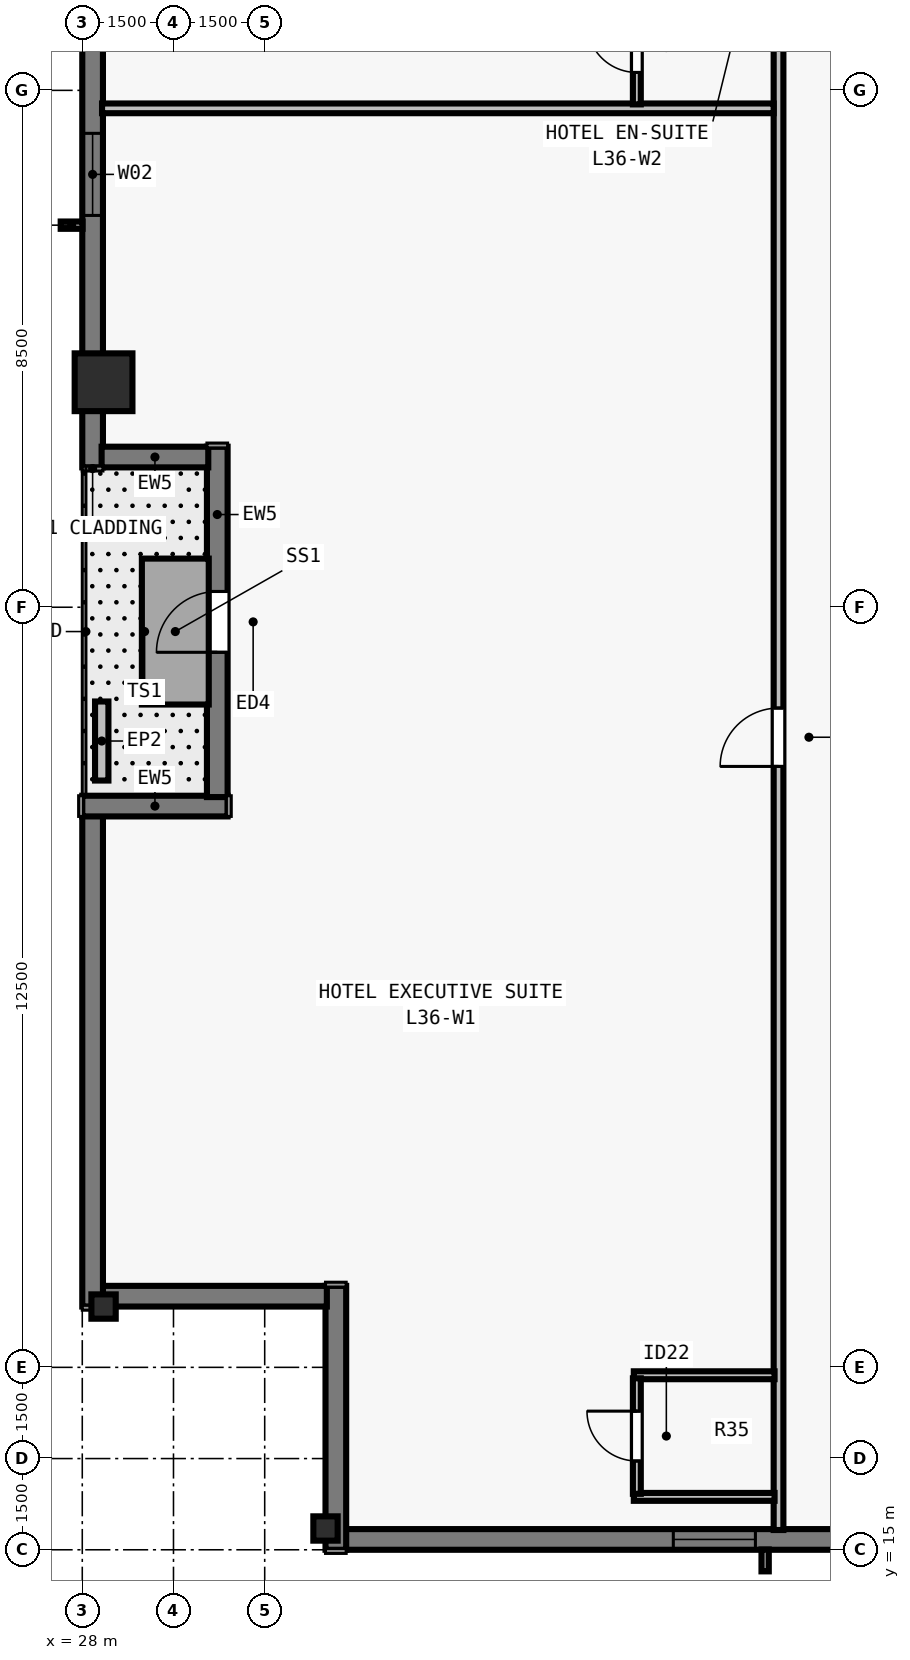
"""IFC4 building model, lengths in metres.
Left out: names, types, materials, properties, quantities, classifications, styles, units other than length and angle.
Written with IfcOpenShell. Run it as: python <this file> out.ifc"""

import sys

from ifc_helpers import new_model, si_unit, direction, frame, frame_2d, origin, origin_2d, place, context, subcontext, project, spatial, rectangle, i_section, extrude, element, fill, save


model = new_model("IFC4")
c1 = context("Model", 3, precision=1e-05, world=origin(), true_north=direction((0.0, 1.0)))
c2 = subcontext(c1, "Body", "Model", "MODEL_VIEW")
j1 = project(units=[si_unit("LENGTHUNIT", "METRE"), si_unit("PLANEANGLEUNIT", "RADIAN")], contexts=[c1])
p1 = place(None, origin())
s1 = spatial("IfcSite", under=j1, at=p1, CompositionType="ELEMENT")
p2 = place(p1, origin())
s2 = spatial("IfcBuilding", under=s1, at=p2, CompositionType="ELEMENT")
p3 = place(p2, frame((0.0, 0.0, 134.0)))
s3 = spatial("IfcBuildingStorey", under=s2, at=p3, CompositionType="ELEMENT", Elevation=134.0)
p4 = place(p3, frame((32.0, 15.35, 0.0), z_axis=(0.0, 0.0, 1.0), x_axis=(1.0, 0.0, 0.0)))
e1 = element("IfcColumn", 1, at=p4, inside=s3, PredefinedType="COLUMN", context=c2, shape_type="SweptSolid", body=[
    extrude(i_section(OverallWidth=0.4, OverallDepth=0.4, WebThickness=0.022, FlangeThickness=0.036, at=origin_2d()), origin(), (0.0, 0.0, 1.0), 3.5),
])
p5 = place(p3, frame((28.35, 34.2, 0.0), z_axis=(0.0, 0.0, 1.0), x_axis=(0.0, 1.0, 0.0)))
e2 = element("IfcColumn", 2, at=p5, inside=s3, PredefinedType="COLUMN", context=c2, shape_type="SweptSolid", body=[
    extrude(rectangle(XDim=0.95, YDim=0.95, at=origin_2d()), origin(), (0.0, 0.0, 1.0), 3.5),
])
p6 = place(p3, frame((28.35, 19.0, 0.0), z_axis=(0.0, 0.0, 1.0), x_axis=(0.0, 1.0, 0.0)))
e3 = element("IfcColumn", 3, at=p6, inside=s3, PredefinedType="COLUMN", context=c2, shape_type="SweptSolid", body=[
    extrude(i_section(OverallWidth=0.4, OverallDepth=0.4, WebThickness=0.022, FlangeThickness=0.036, at=origin_2d()), origin(), (0.0, 0.0, 1.0), 3.5),
])
p7 = place(p3, frame((28.17, 32.8, 0.0), z_axis=(0.0, 0.0, 1.0), x_axis=(0.0, 1.0, 0.0)))
e4 = element("IfcWall", 4, at=p7, inside=s3, PredefinedType="SOLIDWALL", context=c2, shape_type="SweptSolid", body=[
    extrude(rectangle(XDim=25.882, YDim=0.34, at=frame_2d((12.941, 0.0))), origin(), (0.0, 0.0, 1.0), 3.28),
])
p8 = place(p7, frame((4.143, 0.0, 0.8)))
e5 = element("IfcOpeningElement", 5, at=p8, cuts=e4, PredefinedType="OPENING", context=c2, shape_type="SweptSolid", body=[
    extrude(rectangle(XDim=1.35, YDim=1.66, at=frame_2d((0.675, 0.83))), frame((0.0, 0.18, 0.0), z_axis=(0.0, -1.0, 0.0), x_axis=(1.0, 0.0, 0.0)), (0.0, 0.0, 1.0), 0.36),
])
p9 = place(p7, frame((8.43, 0.0, 0.8)))
e6 = element("IfcOpeningElement", 6, at=p9, cuts=e4, PredefinedType="OPENING", context=c2, shape_type="SweptSolid", body=[
    extrude(rectangle(XDim=1.75, YDim=1.66, at=frame_2d((0.875, 0.83))), frame((0.0, 0.18, 0.0), z_axis=(0.0, -1.0, 0.0), x_axis=(1.0, 0.0, 0.0)), (0.0, 0.0, 1.0), 0.36),
])
p10 = place(p7, frame((12.266, 0.0, 0.8)))
e7 = element("IfcOpeningElement", 7, at=p10, cuts=e4, PredefinedType="OPENING", context=c2, shape_type="SweptSolid", body=[
    extrude(rectangle(XDim=1.35, YDim=1.66, at=frame_2d((0.675, 0.83))), frame((0.0, 0.18, 0.0), z_axis=(0.0, -1.0, 0.0), x_axis=(1.0, 0.0, 0.0)), (0.0, 0.0, 1.0), 0.36),
])
p11 = place(p7, frame((15.702, 0.0, 0.8)))
e8 = element("IfcOpeningElement", 8, at=p11, cuts=e4, PredefinedType="OPENING", context=c2, shape_type="SweptSolid", body=[
    extrude(rectangle(XDim=1.75, YDim=1.66, at=frame_2d((0.875, 0.83))), frame((0.0, 0.18, 0.0), z_axis=(0.0, -1.0, 0.0), x_axis=(1.0, 0.0, 0.0)), (0.0, 0.0, 1.0), 0.36),
])
p12 = place(p7, frame((19.539, 0.0, 0.8)))
e9 = element("IfcOpeningElement", 9, at=p12, cuts=e4, PredefinedType="OPENING", context=c2, shape_type="SweptSolid", body=[
    extrude(rectangle(XDim=1.35, YDim=1.66, at=frame_2d((0.675, 0.83))), frame((0.0, 0.18, 0.0), z_axis=(0.0, -1.0, 0.0), x_axis=(1.0, 0.0, 0.0)), (0.0, 0.0, 1.0), 0.36),
])
p13 = place(p3, frame((72.0, 15.17, 0.0), z_axis=(0.0, 0.0, 1.0), x_axis=(-1.0, 0.0, 0.0)))
e10 = element("IfcWall", 10, at=p13, inside=s3, PredefinedType="SOLIDWALL", context=c2, shape_type="SweptSolid", body=[
    extrude(rectangle(XDim=39.682, YDim=0.34, at=frame_2d((19.841, 0.0))), origin(), (0.0, 0.0, 1.0), 3.28),
])
p14 = place(p13, frame((8.755, 0.0, 0.8)))
e11 = element("IfcOpeningElement", 11, at=p14, cuts=e10, PredefinedType="OPENING", context=c2, shape_type="SweptSolid", body=[
    extrude(rectangle(XDim=1.75, YDim=1.66, at=frame_2d((0.875, 0.83))), frame((0.0, 0.18, 0.0), z_axis=(0.0, -1.0, 0.0), x_axis=(1.0, 0.0, 0.0)), (0.0, 0.0, 1.0), 0.36),
])
p15 = place(p13, frame((12.059, 0.0, 0.8)))
e12 = element("IfcOpeningElement", 12, at=p15, cuts=e10, PredefinedType="OPENING", context=c2, shape_type="SweptSolid", body=[
    extrude(rectangle(XDim=1.35, YDim=1.66, at=frame_2d((0.675, 0.83))), frame((0.0, 0.18, 0.0), z_axis=(0.0, -1.0, 0.0), x_axis=(1.0, 0.0, 0.0)), (0.0, 0.0, 1.0), 0.36),
])
p16 = place(p13, frame((16.262, 0.0, 0.8)))
e13 = element("IfcOpeningElement", 13, at=p16, cuts=e10, PredefinedType="OPENING", context=c2, shape_type="SweptSolid", body=[
    extrude(rectangle(XDim=1.75, YDim=1.66, at=frame_2d((0.875, 0.83))), frame((0.0, 0.18, 0.0), z_axis=(0.0, -1.0, 0.0), x_axis=(1.0, 0.0, 0.0)), (0.0, 0.0, 1.0), 0.36),
])
p17 = place(p13, frame((19.166, 0.0, 0.8)))
e14 = element("IfcOpeningElement", 14, at=p17, cuts=e10, PredefinedType="OPENING", context=c2, shape_type="SweptSolid", body=[
    extrude(rectangle(XDim=1.35, YDim=1.66, at=frame_2d((0.675, 0.83))), frame((0.0, 0.18, 0.0), z_axis=(0.0, -1.0, 0.0), x_axis=(1.0, 0.0, 0.0)), (0.0, 0.0, 1.0), 0.36),
])
p18 = place(p13, frame((21.27, 0.0, 0.8)))
e15 = element("IfcOpeningElement", 15, at=p18, cuts=e10, PredefinedType="OPENING", context=c2, shape_type="SweptSolid", body=[
    extrude(rectangle(XDim=1.75, YDim=1.66, at=frame_2d((0.875, 0.83))), frame((0.0, 0.18, 0.0), z_axis=(0.0, -1.0, 0.0), x_axis=(1.0, 0.0, 0.0)), (0.0, 0.0, 1.0), 0.36),
])
p19 = place(p13, frame((26.273, 0.0, 0.8)))
e16 = element("IfcOpeningElement", 16, at=p19, cuts=e10, PredefinedType="OPENING", context=c2, shape_type="SweptSolid", body=[
    extrude(rectangle(XDim=1.35, YDim=1.66, at=frame_2d((0.675, 0.83))), frame((0.0, 0.18, 0.0), z_axis=(0.0, -1.0, 0.0), x_axis=(1.0, 0.0, 0.0)), (0.0, 0.0, 1.0), 0.36),
])
p20 = place(p13, frame((28.377, 0.0, 0.8)))
e17 = element("IfcOpeningElement", 17, at=p20, cuts=e10, PredefinedType="OPENING", context=c2, shape_type="SweptSolid", body=[
    extrude(rectangle(XDim=1.75, YDim=1.66, at=frame_2d((0.875, 0.83))), frame((0.0, 0.18, 0.0), z_axis=(0.0, -1.0, 0.0), x_axis=(1.0, 0.0, 0.0)), (0.0, 0.0, 1.0), 0.36),
])
p21 = place(p13, frame((32.93, 0.0, 0.8)))
e18 = element("IfcOpeningElement", 18, at=p21, cuts=e10, PredefinedType="OPENING", context=c2, shape_type="SweptSolid", body=[
    extrude(rectangle(XDim=1.35, YDim=1.66, at=frame_2d((0.675, 0.83))), frame((0.0, 0.18, 0.0), z_axis=(0.0, -1.0, 0.0), x_axis=(1.0, 0.0, 0.0)), (0.0, 0.0, 1.0), 0.36),
])
p22 = place(p3, frame((32.17, 15.0, 0.0), z_axis=(0.0, 0.0, 1.0), x_axis=(0.0, 1.0, 0.0)))
e19 = element("IfcWall", 19, at=p22, inside=s3, PredefinedType="SOLIDWALL", context=c2, shape_type="SweptSolid", body=[
    extrude(rectangle(XDim=4.34, YDim=0.34, at=frame_2d((2.17, 0.0))), origin(), (0.0, 0.0, 1.0), 3.28),
])
p23 = place(p3, frame((32.022, 19.17, 0.0), z_axis=(0.0, 0.0, 1.0), x_axis=(-1.0, 0.0, 0.0)))
e20 = element("IfcWall", 20, at=p23, inside=s3, PredefinedType="SOLIDWALL", context=c2, shape_type="SweptSolid", body=[
    extrude(rectangle(XDim=3.704, YDim=0.34, at=frame_2d((1.852, 0.0))), origin(), (0.0, 0.0, 1.0), 3.28),
])
p24 = place(p3, frame((28.17, 19.0, 0.0), z_axis=(0.0, 0.0, 1.0), x_axis=(0.0, 1.0, 0.0)))
e21 = element("IfcWall", 21, at=p24, inside=s3, PredefinedType="SOLIDWALL", context=c2, shape_type="SweptSolid", body=[
    extrude(rectangle(XDim=8.082, YDim=0.34, at=frame_2d((4.041, 0.0))), origin(), (0.0, 0.0, 1.0), 3.28),
])
p25 = place(p3, frame((28.0, 27.23, 0.0), z_axis=(0.0, 0.0, 1.0), x_axis=(1.0, 0.0, 0.0)))
e22 = element("IfcWall", 22, at=p25, inside=s3, PredefinedType="SOLIDWALL", context=c2, shape_type="SweptSolid", body=[
    extrude(rectangle(XDim=2.39, YDim=0.34, at=frame_2d((1.195, 0.0))), origin(), (0.0, 0.0, 1.0), 3.28),
])
p26 = place(p3, frame((30.22, 27.378, 0.0), z_axis=(0.0, 0.0, 1.0), x_axis=(0.0, 1.0, 0.0)))
e23 = element("IfcWall", 23, at=p26, inside=s3, PredefinedType="SOLIDWALL", context=c2, shape_type="SweptSolid", body=[
    extrude(rectangle(XDim=5.762, YDim=0.34, at=frame_2d((2.881, 0.0))), origin(), (0.0, 0.0, 1.0), 3.28),
])
p27 = place(p26, frame((2.381, 0.0, 0.0)))
e24 = element("IfcOpeningElement", 24, at=p27, cuts=e23, PredefinedType="OPENING", context=c2, shape_type="SweptSolid", body=[
    extrude(rectangle(XDim=1.0, YDim=2.15, at=frame_2d((0.5, 1.075))), frame((0.0, 0.18, 0.0), z_axis=(0.0, -1.0, 0.0), x_axis=(1.0, 0.0, 0.0)), (0.0, 0.0, 1.0), 0.36),
])
p28 = place(p3, frame((30.072, 32.97, 0.0), z_axis=(0.0, 0.0, 1.0), x_axis=(-1.0, 0.0, 0.0)))
e25 = element("IfcWall", 25, at=p28, inside=s3, PredefinedType="SOLIDWALL", context=c2, shape_type="SweptSolid", body=[
    extrude(rectangle(XDim=1.754, YDim=0.34, at=frame_2d((0.877, 0.0))), origin(), (0.0, 0.0, 1.0), 3.28),
])
p29 = place(p3, frame((28.32, 27.65, 0.0), z_axis=(0.0, 0.0, 1.0), x_axis=(0.0, 1.0, 0.0)))
e26 = element("IfcWall", 26, at=p29, inside=s3, PredefinedType="PARAPET", context=c2, shape_type="SweptSolid", body=[
    extrude(rectangle(XDim=1.3, YDim=0.22, at=frame_2d((0.65, 0.0))), origin(), (0.0, 0.0, 1.0), 0.55),
])
p30 = place(p3, frame((39.45, 15.325, 0.0), z_axis=(0.0, 0.0, 1.0), x_axis=(0.0, 1.0, 0.0)))
e27 = element("IfcWall", 27, at=p30, inside=s3, PredefinedType="PARTITIONING", context=c2, shape_type="SweptSolid", body=[
    extrude(rectangle(XDim=47.35, YDim=0.16, at=frame_2d((23.675, 0.0))), origin(), (0.0, 0.0, 1.0), 2.555),
])
p31 = place(p30, frame((12.557, 0.0, 0.0)))
e28 = element("IfcOpeningElement", 28, at=p31, cuts=e27, PredefinedType="OPENING", context=c2, shape_type="SweptSolid", body=[
    extrude(rectangle(XDim=0.96, YDim=2.15, at=frame_2d((0.48, 1.075))), frame((0.0, 0.09, 0.0), z_axis=(0.0, -1.0, 0.0), x_axis=(1.0, 0.0, 0.0)), (0.0, 0.0, 1.0), 0.18),
])
p32 = place(p30, frame((35.912, 0.0, 0.0)))
e29 = element("IfcOpeningElement", 29, at=p32, cuts=e27, PredefinedType="OPENING", context=c2, shape_type="SweptSolid", body=[
    extrude(rectangle(XDim=0.96, YDim=2.15, at=frame_2d((0.48, 1.075))), frame((0.0, 0.09, 0.0), z_axis=(0.0, -1.0, 0.0), x_axis=(1.0, 0.0, 0.0)), (0.0, 0.0, 1.0), 0.18),
])
for number, where, z_axis, x_axis in (
    (30, (37.07, 15.87, 0.0), (0.0, 0.0, 1.0), (1.0, 0.0, 0.0)),
    (31, (37.07, 17.87, 0.0), (0.0, 0.0, 1.0), (1.0, 0.0, 0.0)),
):
    element("IfcWall", number, at=place(p3, frame(where, z_axis=z_axis, x_axis=x_axis)), inside=s3, PredefinedType="PLUMBINGWALL", context=c2, shape_type="SweptSolid", body=[
        extrude(rectangle(XDim=2.315, YDim=0.13, at=frame_2d((1.157, 0.0))), origin(), (0.0, 0.0, 1.0), 3.28),
    ])
p33 = place(p3, frame((37.12, 15.92, 0.0), z_axis=(0.0, 0.0, 1.0), x_axis=(0.0, 1.0, 0.0)))
e32 = element("IfcWall", 32, at=p33, inside=s3, PredefinedType="PLUMBINGWALL", context=c2, shape_type="SweptSolid", body=[
    extrude(rectangle(XDim=1.9, YDim=0.13, at=frame_2d((0.95, 0.0))), origin(), (0.0, 0.0, 1.0), 3.28),
])
p34 = place(p33, frame((0.54, 0.0, 0.0)))
e33 = element("IfcOpeningElement", 33, at=p34, cuts=e32, PredefinedType="OPENING", context=c2, shape_type="SweptSolid", body=[
    extrude(rectangle(XDim=0.82, YDim=2.1, at=frame_2d((0.41, 1.05))), frame((0.0, 0.075, 0.0), z_axis=(0.0, -1.0, 0.0), x_axis=(1.0, 0.0, 0.0)), (0.0, 0.0, 1.0), 0.15),
])
p35 = place(p3, frame((28.325, 38.704, 0.0), z_axis=(0.0, 0.0, 1.0), x_axis=(1.0, 0.0, 0.0)))
e34 = element("IfcWall", 34, at=p35, inside=s3, PredefinedType="PARTITIONING", context=c2, shape_type="SweptSolid", body=[
    extrude(rectangle(XDim=11.045, YDim=0.16, at=frame_2d((5.522, 0.0))), origin(), (0.0, 0.0, 1.0), 2.896),
])
p36 = place(p3, frame((37.12, 38.769, 0.0), z_axis=(0.0, 0.0, 1.0), x_axis=(0.0, 1.0, 0.0)))
e35 = element("IfcWall", 35, at=p36, inside=s3, PredefinedType="PLUMBINGWALL", context=c2, shape_type="SweptSolid", body=[
    extrude(rectangle(XDim=1.885, YDim=0.13, at=frame_2d((0.942, 0.0))), origin(), (0.0, 0.0, 1.0), 3.28),
])
p37 = place(p36, frame((0.525, 0.0, 0.0)))
e36 = element("IfcOpeningElement", 36, at=p37, cuts=e35, PredefinedType="OPENING", context=c2, shape_type="SweptSolid", body=[
    extrude(rectangle(XDim=0.82, YDim=2.1, at=frame_2d((0.41, 1.05))), frame((0.0, 0.075, 0.0), z_axis=(0.0, -1.0, 0.0), x_axis=(1.0, 0.0, 0.0)), (0.0, 0.0, 1.0), 0.15),
])
p38 = place(p8, origin())
e37 = element("IfcWindow", 37, at=p38, inside=s3, PartitioningType="SINGLE_PANEL", PredefinedType="WINDOW", context=c2, shape_type="SweptSolid", body=[
    extrude(rectangle(XDim=1.35, YDim=1.66, at=frame_2d((0.675, 0.83))), frame((0.0, -0.05, 0.0), z_axis=(0.0, -1.0, 0.0), x_axis=(1.0, 0.0, 0.0)), (0.0, 0.0, 1.0), 0.06),
])
fill(e5, e37)
p39 = place(p21, origin())
e38 = element("IfcWindow", 38, at=p39, inside=s3, PartitioningType="SINGLE_PANEL", PredefinedType="WINDOW", context=c2, shape_type="SweptSolid", body=[
    extrude(rectangle(XDim=1.35, YDim=1.66, at=frame_2d((0.675, 0.83))), frame((0.0, -0.05, 0.0), z_axis=(0.0, -1.0, 0.0), x_axis=(1.0, 0.0, 0.0)), (0.0, 0.0, 1.0), 0.06),
])
fill(e18, e38)
p40 = place(p27, origin())
e39 = element("IfcDoor", 39, at=p40, inside=s3, OperationType="SINGLE_SWING_LEFT", PredefinedType="DOOR", context=c2, shape_type="SweptSolid", body=[
    extrude(rectangle(XDim=1.0, YDim=2.15, at=frame_2d((0.5, 1.075))), frame((0.0, 0.025, 0.0), z_axis=(0.0, -1.0, 0.0), x_axis=(1.0, 0.0, 0.0)), (0.0, 0.0, 1.0), 0.05),
])
fill(e24, e39)
p41 = place(p34, origin())
e40 = element("IfcDoor", 40, at=p41, inside=s3, OperationType="SINGLE_SWING_RIGHT", PredefinedType="DOOR", context=c2, shape_type="SweptSolid", body=[
    extrude(rectangle(XDim=0.82, YDim=2.1, at=frame_2d((0.41, 1.05))), frame((0.0, 0.025, 0.0), z_axis=(0.0, -1.0, 0.0), x_axis=(1.0, 0.0, 0.0)), (0.0, 0.0, 1.0), 0.05),
])
fill(e33, e40)
p42 = place(p31, origin())
e41 = element("IfcDoor", 41, at=p42, inside=s3, OperationType="SINGLE_SWING_LEFT", PredefinedType="DOOR", context=c2, shape_type="SweptSolid", body=[
    extrude(rectangle(XDim=0.96, YDim=2.15, at=frame_2d((0.48, 1.075))), frame((0.0, 0.025, 0.0), z_axis=(0.0, -1.0, 0.0), x_axis=(1.0, 0.0, 0.0)), (0.0, 0.0, 1.0), 0.05),
])
fill(e28, e41)
p43 = place(p37, origin())
e42 = element("IfcDoor", 42, at=p43, inside=s3, OperationType="SINGLE_SWING_RIGHT", PredefinedType="DOOR", context=c2, shape_type="SweptSolid", body=[
    extrude(rectangle(XDim=0.82, YDim=2.1, at=frame_2d((0.41, 1.05))), frame((0.0, 0.025, 0.0), z_axis=(0.0, -1.0, 0.0), x_axis=(1.0, 0.0, 0.0)), (0.0, 0.0, 1.0), 0.05),
])
fill(e36, e42)
save(model, sys.argv[1])
